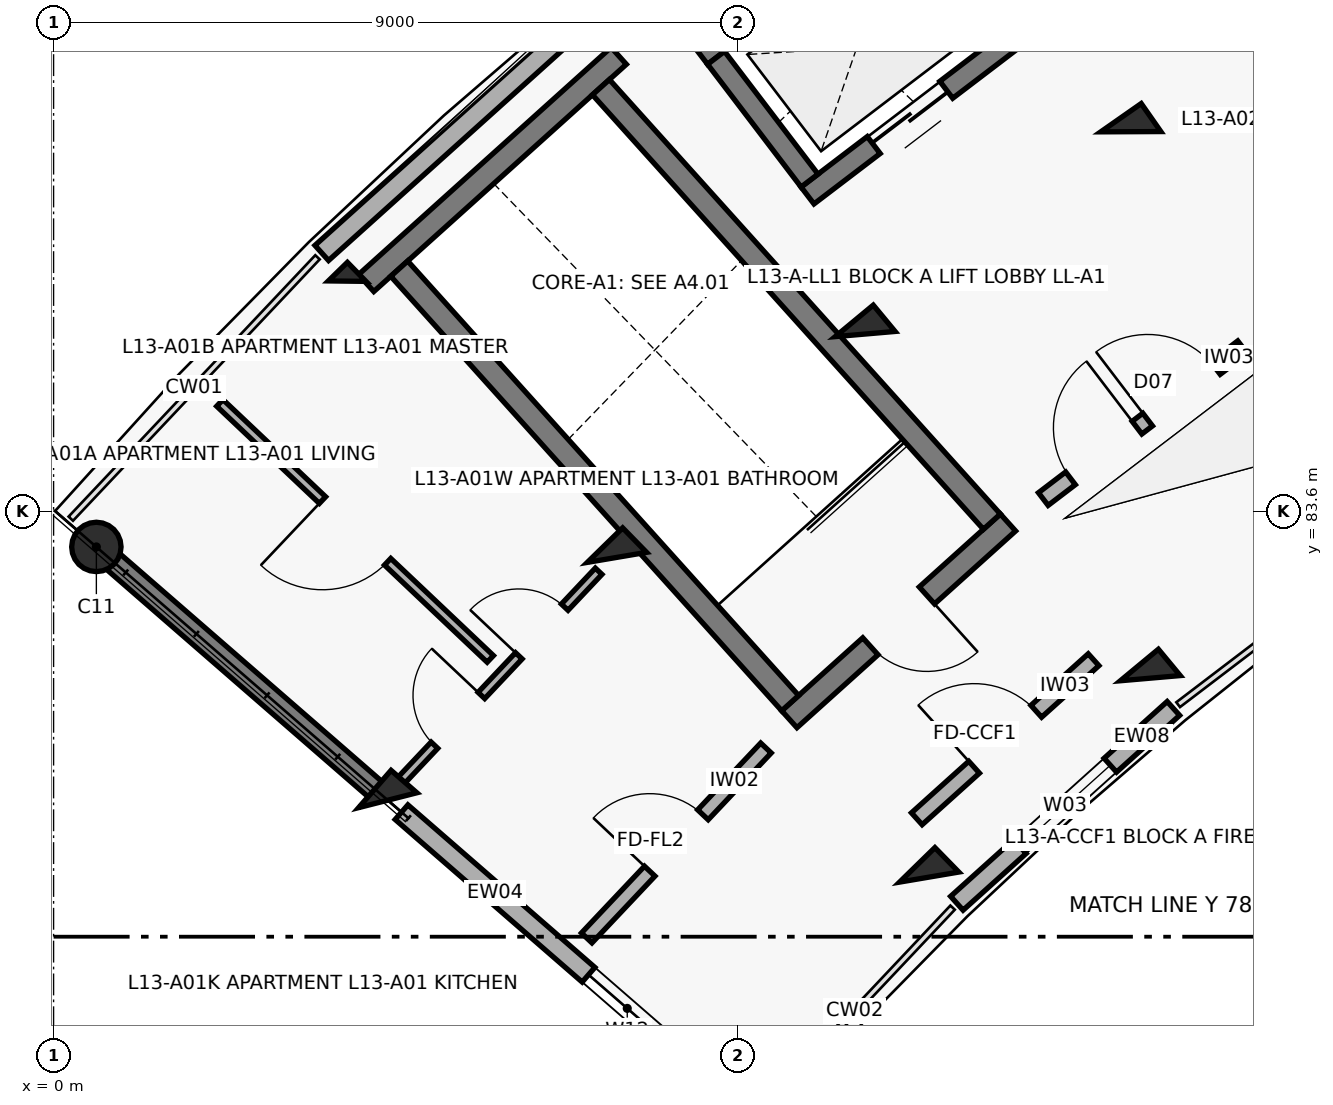
"""IFC4 building model, lengths in metres.
Left out: names, types, materials, properties, quantities, classifications, styles, units other than length and angle.
Written with IfcOpenShell. Run it as: python <this file> out.ifc"""

import sys

from ifc_helpers import new_model, si_unit, direction, frame, frame_2d, origin, origin_2d, place, context, subcontext, project, spatial, rectangle, circle, extrude, element, fill, save


model = new_model("IFC4")
c1 = context("Model", 3, precision=1e-05, world=origin(), true_north=direction((0.0, 1.0)))
c2 = subcontext(c1, "Body", "Model", "MODEL_VIEW")
j1 = project(units=[si_unit("LENGTHUNIT", "METRE"), si_unit("PLANEANGLEUNIT", "RADIAN")], contexts=[c1])
p1 = place(None, origin())
s1 = spatial("IfcSite", under=j1, at=p1, CompositionType="ELEMENT")
p2 = place(p1, origin())
s2 = spatial("IfcBuilding", under=s1, at=p2, CompositionType="ELEMENT")
p3 = place(p2, frame((0.0, 0.0, 42.2)))
s3 = spatial("IfcBuildingStorey", under=s2, at=p3, CompositionType="ELEMENT", Elevation=42.2)
p4 = place(p3, frame((4.397, 79.796, 0.0), z_axis=(0.0, 0.0, 1.0), x_axis=(-0.754709580223, 0.656059028991, 0.0)))
e1 = element("IfcColumn", 1, at=p4, inside=s3, PredefinedType="COLUMN", context=c2, shape_type="SweptSolid", body=[
    extrude(rectangle(XDim=0.45, YDim=0.65, at=origin_2d()), origin(), (0.0, 0.0, 1.0), 3.1),
])
p5 = place(p3, frame((0.563, 83.129, 0.0), z_axis=(0.0, 0.0, 1.0), x_axis=(-0.754709580223, 0.656059028991, 0.0)))
e2 = element("IfcColumn", 2, at=p5, inside=s3, PredefinedType="COLUMN", context=c2, shape_type="SweptSolid", body=[
    extrude(circle(Radius=0.325, at=origin_2d()), origin(), (0.0, 0.0, 1.0), 3.1),
])
for number, where, z_axis, x_axis in (
    (3, (11.52, 78.784, 0.0), (0.0, 0.0, 1.0), (-0.699, 0.715, 0.0)),
    (4, (7.412, 82.991, 0.0), (0.0, 0.0, 1.0), (-0.699, 0.715, 0.0)),
):
    element("IfcColumn", number, at=place(p3, frame(where, z_axis=z_axis, x_axis=x_axis)), inside=s3, PredefinedType="COLUMN", context=c2, shape_type="SweptSolid", body=[
        extrude(rectangle(XDim=0.45, YDim=0.65, at=origin_2d()), origin(), (0.0, 0.0, 1.0), 3.1),
    ])
p6 = place(p3, frame((3.863, 86.626, 0.0), z_axis=(0.0, 0.0, 1.0), x_axis=(-0.698665066769, 0.715448897181, 0.0)))
e5 = element("IfcColumn", 5, at=p6, inside=s3, PredefinedType="COLUMN", context=c2, shape_type="SweptSolid", body=[
    extrude(rectangle(XDim=0.35, YDim=0.35, at=origin_2d()), origin(), (0.0, 0.0, 1.0), 3.1),
])
for number, where, z_axis, x_axis in (
    (6, (14.429, 81.402, 0.0), (0.0, 0.0, 1.0), (-0.638, 0.77, 0.0)),
    (7, (10.678, 85.93, 0.0), (0.0, 0.0, 1.0), (-0.638, 0.77, 0.0)),
):
    element("IfcColumn", number, at=place(p3, frame(where, z_axis=z_axis, x_axis=x_axis)), inside=s3, PredefinedType="COLUMN", context=c2, shape_type="SweptSolid", body=[
        extrude(rectangle(XDim=0.45, YDim=0.65, at=origin_2d()), origin(), (0.0, 0.0, 1.0), 3.1),
    ])
p7 = place(p3, frame((7.437, 89.842, 0.0), z_axis=(0.0, 0.0, 1.0), x_axis=(-0.637961754089, 0.770068049148, 0.0)))
e8 = element("IfcColumn", 8, at=p7, inside=s3, PredefinedType="COLUMN", context=c2, shape_type="SweptSolid", body=[
    extrude(rectangle(XDim=0.4, YDim=0.6, at=origin_2d()), origin(), (0.0, 0.0, 1.0), 3.1),
])
p8 = place(p3, frame((14.172, 88.592, 0.0), z_axis=(0.0, 0.0, 1.0), x_axis=(-0.573004420611, 0.819552276527, 0.0)))
e9 = element("IfcColumn", 9, at=p8, inside=s3, PredefinedType="COLUMN", context=c2, shape_type="SweptSolid", body=[
    extrude(rectangle(XDim=0.45, YDim=0.65, at=origin_2d()), origin(), (0.0, 0.0, 1.0), 3.1),
])
p9 = place(p3, frame((4.261, 79.914, 0.0), z_axis=(0.0, 0.0, 1.0), x_axis=(-0.754703505217, 0.65606601742, 0.0)))
e10 = element("IfcWall", 10, at=p9, inside=s3, PredefinedType="SHEAR", context=c2, shape_type="SweptSolid", body=[
    extrude(rectangle(XDim=4.72, YDim=0.27, at=frame_2d((2.36, 0.0))), origin(), (0.0, 0.0, 1.0), 2.92),
])
p10 = place(p3, frame((3.528, 86.997, 0.0), z_axis=(0.0, 0.0, 1.0), x_axis=(0.743387539862, 0.668860946369, 0.0)))
e11 = element("IfcWall", 11, at=p10, inside=s3, PredefinedType="SOLIDWALL", context=c2, shape_type="SweptSolid", body=[
    extrude(rectangle(XDim=4.809, YDim=0.268, at=frame_2d((2.405, 0.0))), origin(), (0.0, 0.0, 1.0), 2.25),
])
p11 = place(p3, frame((11.884, 78.44, 0.0), z_axis=(0.0, 0.0, 1.0), x_axis=(0.743363835609, 0.668887290886, 0.0)))
e12 = element("IfcWall", 12, at=p11, inside=s3, PredefinedType="SOLIDWALL", context=c2, shape_type="SweptSolid", body=[
    extrude(rectangle(XDim=3.832, YDim=0.245, at=frame_2d((1.916, 0.0))), origin(), (0.0, 0.0, 1.0), 2.25),
])
p12 = place(p11, frame((1.116, 0.0, 0.32)))
e13 = element("IfcOpeningElement", 13, at=p12, cuts=e12, PredefinedType="OPENING", context=c2, shape_type="SweptSolid", body=[
    extrude(rectangle(XDim=1.6, YDim=1.5, at=frame_2d((0.8, 0.75))), frame((0.0, 0.133, 0.0), z_axis=(0.0, -1.0, 0.0), x_axis=(1.0, 0.0, 0.0)), (0.0, 0.0, 1.0), 0.265),
])
p13 = place(p3, frame((8.653, 76.096, 0.0), z_axis=(0.0, 0.0, 1.0), x_axis=(-0.754709658894, 0.65605893849, 0.0)))
e14 = element("IfcWall", 14, at=p13, inside=s3, PredefinedType="SOLIDWALL", context=c2, shape_type="SweptSolid", body=[
    extrude(rectangle(XDim=5.4, YDim=0.255, at=frame_2d((2.7, 0.0))), origin(), (0.0, 0.0, 1.0), 2.24),
])
p14 = place(p13, frame((0.79, 0.0, 0.75)))
e15 = element("IfcOpeningElement", 15, at=p14, cuts=e14, PredefinedType="OPENING", context=c2, shape_type="SweptSolid", body=[
    extrude(rectangle(XDim=1.35, YDim=1.35, at=frame_2d((0.675, 0.675))), frame((0.0, 0.137, 0.0), z_axis=(0.0, -1.0, 0.0), x_axis=(1.0, 0.0, 0.0)), (0.0, 0.0, 1.0), 0.275),
])
p15 = place(p3, frame((12.557, 83.45, 0.0), z_axis=(0.0, 0.0, 1.0), x_axis=(-0.743375696158, -0.668874109501, 0.0)))
e16 = element("IfcWall", 16, at=p15, inside=s3, PredefinedType="SHEAR", context=c2, shape_type="SweptSolid", body=[
    extrude(rectangle(XDim=3.87, YDim=0.3, at=frame_2d((1.935, 0.0))), origin(), (0.0, 0.0, 1.0), 3.1),
])
p16 = place(p15, frame((1.435, 0.0, 0.0)))
e17 = element("IfcOpeningElement", 17, at=p16, cuts=e16, PredefinedType="OPENING", context=c2, shape_type="SweptSolid", body=[
    extrude(rectangle(XDim=1.0, YDim=2.15, at=frame_2d((0.5, 1.075))), frame((0.0, 0.16, 0.0), z_axis=(0.0, -1.0, 0.0), x_axis=(1.0, 0.0, 0.0)), (0.0, 0.0, 1.0), 0.32),
])
p17 = place(p3, frame((7.436, 89.59, 0.0), z_axis=(0.0, 0.0, 1.0), x_axis=(-0.743400052815, -0.668847038922, 0.0)))
e18 = element("IfcWall", 18, at=p17, inside=s3, PredefinedType="SHEAR", context=c2, shape_type="SweptSolid", body=[
    extrude(rectangle(XDim=4.47, YDim=0.3, at=frame_2d((2.235, 0.0))), origin(), (0.0, 0.0, 1.0), 3.1),
])
p18 = place(p3, frame((12.345, 83.461, 0.0), z_axis=(0.0, 0.0, 1.0), x_axis=(-0.668868253964, 0.743380964808, 0.0)))
e19 = element("IfcWall", 19, at=p18, inside=s3, PredefinedType="SHEAR", context=c2, shape_type="SweptSolid", body=[
    extrude(rectangle(XDim=7.69, YDim=0.3, at=frame_2d((3.845, 0.0))), origin(), (0.0, 0.0, 1.0), 3.1),
])
p19 = place(p3, frame((9.691, 81.073, 0.0), z_axis=(0.0, 0.0, 1.0), x_axis=(-0.668885797871, 0.743365179038, 0.0)))
e20 = element("IfcWall", 20, at=p19, inside=s3, PredefinedType="SHEAR", context=c2, shape_type="SweptSolid", body=[
    extrude(rectangle(XDim=7.69, YDim=0.3, at=frame_2d((3.845, 0.0))), origin(), (0.0, 0.0, 1.0), 3.1),
])
p20 = place(p3, frame((12.616, 89.807, 0.0), z_axis=(0.0, 0.0, 1.0), x_axis=(-0.795474703455, -0.605986795371, 0.0)))
e21 = element("IfcWall", 21, at=p20, inside=s3, PredefinedType="SHEAR", context=c2, shape_type="SweptSolid", body=[
    extrude(rectangle(XDim=3.39, YDim=0.28, at=frame_2d((1.695, 0.0))), origin(), (0.0, 0.0, 1.0), 3.55),
])
p21 = place(p20, frame((1.095, 0.0, 0.0)))
e22 = element("IfcOpeningElement", 22, at=p21, cuts=e21, PredefinedType="OPENING", context=c2, shape_type="SweptSolid", body=[
    extrude(rectangle(XDim=1.2, YDim=2.15, at=frame_2d((0.6, 1.075))), frame((0.0, 0.15, 0.0), z_axis=(0.0, -1.0, 0.0), x_axis=(1.0, 0.0, 0.0)), (0.0, 0.0, 1.0), 0.3),
])
p22 = place(p3, frame((11.216, 91.645, 0.0), z_axis=(0.0, 0.0, 1.0), x_axis=(-0.795439986025, -0.606032365994, 0.0)))
e23 = element("IfcWall", 23, at=p22, inside=s3, PredefinedType="SHEAR", context=c2, shape_type="SweptSolid", body=[
    extrude(rectangle(XDim=3.39, YDim=0.28, at=frame_2d((1.695, 0.0))), origin(), (0.0, 0.0, 1.0), 3.55),
])
p23 = place(p3, frame((9.946, 87.949, 0.0), z_axis=(0.0, 0.0, 1.0), x_axis=(-0.605891019062, 0.795547656033, 0.0)))
e24 = element("IfcWall", 24, at=p23, inside=s3, PredefinedType="SHEAR", context=c2, shape_type="SweptSolid", body=[
    extrude(rectangle(XDim=2.03, YDim=0.28, at=frame_2d((1.015, 0.0))), origin(), (0.0, 0.0, 1.0), 3.55),
])
p24 = place(p3, frame((7.014, 77.984, 0.0), z_axis=(0.0, 0.0, 1.0), x_axis=(0.686310507227, 0.727308660522, 0.0)))
e25 = element("IfcWall", 25, at=p24, inside=s3, PredefinedType="SOLIDWALL", context=c2, shape_type="SweptSolid", body=[
    extrude(rectangle(XDim=3.436, YDim=0.19, at=frame_2d((1.718, 0.0))), origin(), (0.0, 0.0, 1.0), 2.14),
])
p25 = place(p24, frame((1.208, 0.0, 0.0)))
e26 = element("IfcOpeningElement", 26, at=p25, cuts=e25, PredefinedType="OPENING", context=c2, shape_type="SweptSolid", body=[
    extrude(rectangle(XDim=1.02, YDim=2.15, at=frame_2d((0.51, 1.075))), frame((0.0, 0.105, 0.0), z_axis=(0.0, -1.0, 0.0), x_axis=(1.0, 0.0, 0.0)), (0.0, 0.0, 1.0), 0.21),
])
p26 = place(p3, frame((4.565, 80.047, 0.0), z_axis=(0.0, 0.0, 1.0), x_axis=(0.686300649561, 0.727317962388, 0.0)))
e27 = element("IfcWall", 27, at=p26, inside=s3, PredefinedType="PARTITIONING", context=c2, shape_type="SweptSolid", body=[
    extrude(rectangle(XDim=3.797, YDim=0.12, at=frame_2d((1.899, 0.0))), origin(), (0.0, 0.0, 1.0), 2.14),
])
p27 = place(p26, frame((0.65, 0.0, 0.0)))
e28 = element("IfcOpeningElement", 28, at=p27, cuts=e27, PredefinedType="OPENING", context=c2, shape_type="SweptSolid", body=[
    extrude(rectangle(XDim=0.9, YDim=2.1, at=frame_2d((0.45, 1.05))), frame((0.0, 0.07, 0.0), z_axis=(0.0, -1.0, 0.0), x_axis=(1.0, 0.0, 0.0)), (0.0, 0.0, 1.0), 0.14),
])
p28 = place(p26, frame((2.267, 0.0, 0.0)))
e29 = element("IfcOpeningElement", 29, at=p28, cuts=e27, PredefinedType="OPENING", context=c2, shape_type="SweptSolid", body=[
    extrude(rectangle(XDim=0.88, YDim=2.1, at=frame_2d((0.44, 1.05))), frame((0.0, 0.07, 0.0), z_axis=(0.0, -1.0, 0.0), x_axis=(1.0, 0.0, 0.0)), (0.0, 0.0, 1.0), 0.14),
])
p29 = place(p3, frame((5.746, 81.655, 0.0), z_axis=(0.0, 0.0, 1.0), x_axis=(-0.726295620759, 0.687382478149, 0.0)))
e30 = element("IfcWall", 30, at=p29, inside=s3, PredefinedType="PARTITIONING", context=c2, shape_type="SweptSolid", body=[
    extrude(rectangle(XDim=4.9, YDim=0.12, at=frame_2d((2.45, 0.0))), origin(), (0.0, 0.0, 1.0), 2.14),
])
p30 = place(p29, frame((1.86, 0.0, 0.0)))
e31 = element("IfcOpeningElement", 31, at=p30, cuts=e30, PredefinedType="OPENING", context=c2, shape_type="SweptSolid", body=[
    extrude(rectangle(XDim=1.18, YDim=2.1, at=frame_2d((0.59, 1.05))), frame((0.0, 0.07, 0.0), z_axis=(0.0, -1.0, 0.0), x_axis=(1.0, 0.0, 0.0)), (0.0, 0.0, 1.0), 0.14),
])
p31 = place(p3, frame((11.357, 79.552, 0.0), z_axis=(0.0, 0.0, 1.0), x_axis=(0.743387266925, 0.668861249718, 0.0)))
e32 = element("IfcWall", 32, at=p31, inside=s3, PredefinedType="SOLIDWALL", context=c2, shape_type="SweptSolid", body=[
    extrude(rectangle(XDim=3.128, YDim=0.21, at=frame_2d((1.564, 0.0))), origin(), (0.0, 0.0, 1.0), 2.14),
])
p32 = place(p31, frame((1.014, 0.0, 0.0)))
e33 = element("IfcOpeningElement", 33, at=p32, cuts=e32, PredefinedType="OPENING", context=c2, shape_type="SweptSolid", body=[
    extrude(rectangle(XDim=1.1, YDim=2.15, at=frame_2d((0.55, 1.075))), frame((0.0, 0.115, 0.0), z_axis=(0.0, -1.0, 0.0), x_axis=(1.0, 0.0, 0.0)), (0.0, 0.0, 1.0), 0.23),
])
p33 = place(p3, frame((13.021, 83.759, 0.0), z_axis=(0.0, 0.0, 1.0), x_axis=(0.795498026433, 0.605956178235, 0.0)))
e34 = element("IfcWall", 34, at=p33, inside=s3, PredefinedType="SOLIDWALL", context=c2, shape_type="SweptSolid", body=[
    extrude(rectangle(XDim=3.296, YDim=0.21, at=frame_2d((1.648, 0.0))), origin(), (0.0, 0.0, 1.0), 2.14),
])
p34 = place(p33, frame((0.45, 0.0, 0.0)))
e35 = element("IfcOpeningElement", 35, at=p34, cuts=e34, PredefinedType="OPENING", context=c2, shape_type="SweptSolid", body=[
    extrude(rectangle(XDim=1.1, YDim=2.15, at=frame_2d((0.55, 1.075))), frame((0.0, 0.115, 0.0), z_axis=(0.0, -1.0, 0.0), x_axis=(1.0, 0.0, 0.0)), (0.0, 0.0, 1.0), 0.23),
])
p35 = place(p33, frame((1.726, 0.0, 0.0)))
e36 = element("IfcOpeningElement", 36, at=p35, cuts=e34, PredefinedType="OPENING", context=c2, shape_type="SweptSolid", body=[
    extrude(rectangle(XDim=1.12, YDim=2.15, at=frame_2d((0.56, 1.075))), frame((0.0, 0.115, 0.0), z_axis=(0.0, -1.0, 0.0), x_axis=(1.0, 0.0, 0.0)), (0.0, 0.0, 1.0), 0.23),
])
p36 = place(p3, frame((17.524, 87.288, 0.0), z_axis=(0.0, 0.0, 1.0), x_axis=(-0.540338452216, 0.841447774408, 0.0)))
e37 = element("IfcWall", 37, at=p36, inside=s3, PredefinedType="PARTITIONING", context=c2, shape_type="SweptSolid", body=[
    extrude(rectangle(XDim=7.95, YDim=0.14, at=frame_2d((3.975, 0.0))), origin(), (0.0, 0.0, 1.0), 2.14),
])
p37 = place(p36, frame((6.05, 0.0, 0.0)))
e38 = element("IfcOpeningElement", 38, at=p37, cuts=e37, PredefinedType="OPENING", context=c2, shape_type="SweptSolid", body=[
    extrude(rectangle(XDim=0.92, YDim=2.1, at=frame_2d((0.46, 1.05))), frame((0.0, 0.08, 0.0), z_axis=(0.0, -1.0, 0.0), x_axis=(1.0, 0.0, 0.0)), (0.0, 0.0, 1.0), 0.16),
])
p38 = place(p12, origin())
e39 = element("IfcWindow", 39, at=p38, inside=s3, PartitioningType="DOUBLE_PANEL_VERTICAL", PredefinedType="WINDOW", context=c2, shape_type="SweptSolid", body=[
    extrude(rectangle(XDim=1.6, YDim=1.5, at=frame_2d((0.8, 0.75))), frame((0.0, 0.03, 0.0), z_axis=(0.0, -1.0, 0.0), x_axis=(1.0, 0.0, 0.0)), (0.0, 0.0, 1.0), 0.06),
])
fill(e13, e39)
p39 = place(p14, origin())
e40 = element("IfcWindow", 40, at=p39, inside=s3, PartitioningType="DOUBLE_PANEL_VERTICAL", PredefinedType="WINDOW", context=c2, shape_type="SweptSolid", body=[
    extrude(rectangle(XDim=1.35, YDim=1.35, at=frame_2d((0.675, 0.675))), frame((0.0, 0.03, 0.0), z_axis=(0.0, -1.0, 0.0), x_axis=(1.0, 0.0, 0.0)), (0.0, 0.0, 1.0), 0.06),
])
fill(e15, e40)
p40 = place(p16, origin())
e41 = element("IfcDoor", 41, at=p40, inside=s3, OperationType="SINGLE_SWING_LEFT", PredefinedType="DOOR", context=c2, shape_type="SweptSolid", body=[
    extrude(rectangle(XDim=1.0, YDim=2.15, at=frame_2d((0.5, 1.075))), frame((0.0, 0.025, 0.0), z_axis=(0.0, -1.0, 0.0), x_axis=(1.0, 0.0, 0.0)), (0.0, 0.0, 1.0), 0.05),
])
fill(e17, e41)
p41 = place(p21, origin())
e42 = element("IfcDoor", 42, at=p41, inside=s3, OperationType="DOUBLE_DOOR_SLIDING", PredefinedType="DOOR", context=c2, shape_type="SweptSolid", body=[
    extrude(rectangle(XDim=1.2, YDim=2.15, at=frame_2d((0.6, 1.075))), frame((0.0, 0.025, 0.0), z_axis=(0.0, -1.0, 0.0), x_axis=(1.0, 0.0, 0.0)), (0.0, 0.0, 1.0), 0.05),
])
fill(e22, e42)
p42 = place(p25, origin())
e43 = element("IfcDoor", 43, at=p42, inside=s3, OperationType="SINGLE_SWING_LEFT", PredefinedType="DOOR", context=c2, shape_type="SweptSolid", body=[
    extrude(rectangle(XDim=1.02, YDim=2.15, at=frame_2d((0.51, 1.075))), frame((0.0, 0.025, 0.0), z_axis=(0.0, -1.0, 0.0), x_axis=(1.0, 0.0, 0.0)), (0.0, 0.0, 1.0), 0.05),
])
fill(e26, e43)
p43 = place(p27, origin())
e44 = element("IfcDoor", 44, at=p43, inside=s3, OperationType="SINGLE_SWING_RIGHT", PredefinedType="DOOR", context=c2, shape_type="SweptSolid", body=[
    extrude(rectangle(XDim=0.9, YDim=2.1, at=frame_2d((0.45, 1.05))), frame((0.0, 0.025, 0.0), z_axis=(0.0, -1.0, 0.0), x_axis=(1.0, 0.0, 0.0)), (0.0, 0.0, 1.0), 0.05),
])
fill(e28, e44)
p44 = place(p28, origin())
e45 = element("IfcDoor", 45, at=p44, inside=s3, OperationType="SINGLE_SWING_LEFT", PredefinedType="DOOR", context=c2, shape_type="SweptSolid", body=[
    extrude(rectangle(XDim=0.88, YDim=2.1, at=frame_2d((0.44, 1.05))), frame((0.0, 0.025, 0.0), z_axis=(0.0, -1.0, 0.0), x_axis=(1.0, 0.0, 0.0)), (0.0, 0.0, 1.0), 0.05),
])
fill(e29, e45)
p45 = place(p30, origin())
e46 = element("IfcDoor", 46, at=p45, inside=s3, OperationType="SINGLE_SWING_RIGHT", PredefinedType="DOOR", context=c2, shape_type="SweptSolid", body=[
    extrude(rectangle(XDim=1.18, YDim=2.1, at=frame_2d((0.59, 1.05))), frame((0.0, 0.025, 0.0), z_axis=(0.0, -1.0, 0.0), x_axis=(1.0, 0.0, 0.0)), (0.0, 0.0, 1.0), 0.05),
])
fill(e31, e46)
p46 = place(p32, origin())
e47 = element("IfcDoor", 47, at=p46, inside=s3, OperationType="SINGLE_SWING_LEFT", PredefinedType="DOOR", context=c2, shape_type="SweptSolid", body=[
    extrude(rectangle(XDim=1.1, YDim=2.15, at=frame_2d((0.55, 1.075))), frame((0.0, 0.025, 0.0), z_axis=(0.0, -1.0, 0.0), x_axis=(1.0, 0.0, 0.0)), (0.0, 0.0, 1.0), 0.05),
])
fill(e33, e47)
p47 = place(p34, origin())
e48 = element("IfcDoor", 48, at=p47, inside=s3, OperationType="SINGLE_SWING_RIGHT", PredefinedType="DOOR", context=c2, shape_type="SweptSolid", body=[
    extrude(rectangle(XDim=1.1, YDim=2.15, at=frame_2d((0.55, 1.075))), frame((0.0, 0.025, 0.0), z_axis=(0.0, -1.0, 0.0), x_axis=(1.0, 0.0, 0.0)), (0.0, 0.0, 1.0), 0.05),
])
fill(e35, e48)
p48 = place(p35, origin())
e49 = element("IfcDoor", 49, at=p48, inside=s3, OperationType="SINGLE_SWING_LEFT", PredefinedType="DOOR", context=c2, shape_type="SweptSolid", body=[
    extrude(rectangle(XDim=1.12, YDim=2.15, at=frame_2d((0.56, 1.075))), frame((0.0, 0.025, 0.0), z_axis=(0.0, -1.0, 0.0), x_axis=(1.0, 0.0, 0.0)), (0.0, 0.0, 1.0), 0.05),
])
fill(e36, e49)
save(model, sys.argv[1])
